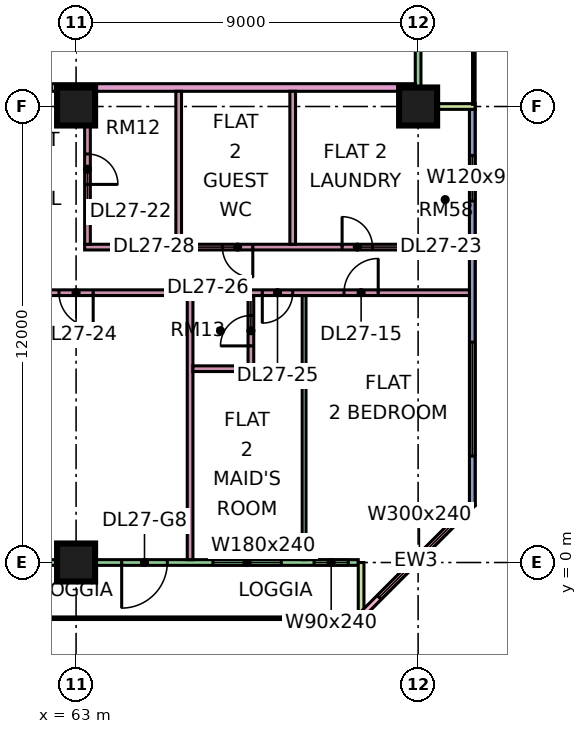
"""IFC4 building model, lengths in metres.
Left out: names, types, materials, properties, quantities, classifications, styles, units other than length and angle.
Written with IfcOpenShell. Run it as: python <this file> out.ifc"""

import sys

from ifc_helpers import new_model, si_unit, direction, frame, frame_2d, origin, origin_2d, place, context, subcontext, project, spatial, rectangle, extrude, element, fill, save


model = new_model("IFC4")
c1 = context("Model", 3, precision=1e-05, world=origin(), true_north=direction((0.0, 1.0)))
c2 = subcontext(c1, "Body", "Model", "MODEL_VIEW")
j1 = project(units=[si_unit("LENGTHUNIT", "METRE"), si_unit("PLANEANGLEUNIT", "RADIAN")], contexts=[c1])
p1 = place(None, origin())
s1 = spatial("IfcSite", under=j1, at=p1, CompositionType="ELEMENT")
p2 = place(p1, origin())
s2 = spatial("IfcBuilding", under=s1, at=p2, CompositionType="ELEMENT")
p3 = place(p2, frame((0.0, 0.0, 118.15)))
s3 = spatial("IfcBuildingStorey", under=s2, at=p3, CompositionType="ELEMENT", Elevation=118.15)
for number, where, z_axis, x_axis in (
    (1, (63.0, 0.0, 0.0), (0.0, 0.0, 1.0), (1.0, 0.0, 0.0)),
    (2, (63.0, 12.0, 0.0), (0.0, 0.0, 1.0), (1.0, 0.0, 0.0)),
    (3, (72.0, 12.0, 0.0), (0.0, 0.0, 1.0), (1.0, 0.0, 0.0)),
):
    element("IfcColumn", number, at=place(p3, frame(where, z_axis=z_axis, x_axis=x_axis)), inside=s3, PredefinedType="COLUMN", context=c2, shape_type="SweptSolid", body=[
        extrude(rectangle(XDim=1.0, YDim=1.0, at=origin_2d()), origin(), (0.0, 0.0, 1.0), 3.75),
    ])
p4 = place(p3, frame((60.075, 0.0, 0.0), z_axis=(0.0, 0.0, 1.0), x_axis=(1.0, 0.0, 0.0)))
e4 = element("IfcWall", 4, at=p4, inside=s3, PredefinedType="SOLIDWALL", context=c2, shape_type="SweptSolid", body=[
    extrude(rectangle(XDim=10.35, YDim=0.15, at=frame_2d((5.175, 0.0))), origin(), (0.0, 0.0, 1.0), 3.35),
])
p5 = place(p4, frame((0.562, 0.0, 0.45)))
e5 = element("IfcOpeningElement", 5, at=p5, cuts=e4, PredefinedType="OPENING", context=c2, shape_type="SweptSolid", body=[
    extrude(rectangle(XDim=1.2, YDim=2.4, at=frame_2d((0.6, 1.2))), frame((0.0, 0.085, 0.0), z_axis=(0.0, -1.0, 0.0), x_axis=(1.0, 0.0, 0.0)), (0.0, 0.0, 1.0), 0.17),
])
p6 = place(p4, frame((4.125, 0.0, 0.0)))
e6 = element("IfcOpeningElement", 6, at=p6, cuts=e4, PredefinedType="OPENING", context=c2, shape_type="SweptSolid", body=[
    extrude(rectangle(XDim=1.2, YDim=2.4, at=frame_2d((0.6, 1.2))), frame((0.0, 0.085, 0.0), z_axis=(0.0, -1.0, 0.0), x_axis=(1.0, 0.0, 0.0)), (0.0, 0.0, 1.0), 0.17),
])
p7 = place(p4, frame((6.525, 0.0, 0.45)))
e7 = element("IfcOpeningElement", 7, at=p7, cuts=e4, PredefinedType="OPENING", context=c2, shape_type="SweptSolid", body=[
    extrude(rectangle(XDim=1.8, YDim=2.4, at=frame_2d((0.9, 1.2))), frame((0.0, 0.085, 0.0), z_axis=(0.0, -1.0, 0.0), x_axis=(1.0, 0.0, 0.0)), (0.0, 0.0, 1.0), 0.17),
])
p8 = place(p4, frame((9.188, 0.0, 0.45)))
e8 = element("IfcOpeningElement", 8, at=p8, cuts=e4, PredefinedType="OPENING", context=c2, shape_type="SweptSolid", body=[
    extrude(rectangle(XDim=0.9, YDim=2.4, at=frame_2d((0.45, 1.2))), frame((0.0, 0.085, 0.0), z_axis=(0.0, -1.0, 0.0), x_axis=(1.0, 0.0, 0.0)), (0.0, 0.0, 1.0), 0.17),
])
p9 = place(p3, frame((70.5, -1.5, 0.0), z_axis=(0.0, 0.0, 1.0), x_axis=(0.0, 1.0, 0.0)))
e9 = element("IfcWall", 9, at=p9, inside=s3, PredefinedType="SOLIDWALL", context=c2, shape_type="SweptSolid", body=[
    extrude(rectangle(XDim=1.5, YDim=0.15, at=frame_2d((0.75, 0.0))), origin(), (0.0, 0.0, 1.0), 3.35),
])
p10 = place(p3, frame((70.447, -1.447, 0.0), z_axis=(0.0, 0.0, 1.0), x_axis=(0.707106781187, 0.707106781187, 0.0)))
e10 = element("IfcWall", 10, at=p10, inside=s3, PredefinedType="SOLIDWALL", context=c2, shape_type="SweptSolid", body=[
    extrude(rectangle(XDim=4.243, YDim=0.15, at=frame_2d((2.121, 0.0))), origin(), (0.0, 0.0, 1.0), 3.35),
])
p11 = place(p10, frame((0.744, 0.0, 0.45)))
e11 = element("IfcOpeningElement", 11, at=p11, cuts=e10, PredefinedType="OPENING", context=c2, shape_type="SweptSolid", body=[
    extrude(rectangle(XDim=3.0, YDim=2.4, at=frame_2d((1.5, 1.2))), frame((0.0, 0.085, 0.0), z_axis=(0.0, -1.0, 0.0), x_axis=(1.0, 0.0, 0.0)), (0.0, 0.0, 1.0), 0.17),
])
p12 = place(p3, frame((73.425, 1.5, 0.0), z_axis=(0.0, 0.0, 1.0), x_axis=(0.0, 1.0, 0.0)))
e12 = element("IfcWall", 12, at=p12, inside=s3, PredefinedType="SOLIDWALL", context=c2, shape_type="SweptSolid", body=[
    extrude(rectangle(XDim=10.425, YDim=0.15, at=frame_2d((5.212, 0.0))), origin(), (0.0, 0.0, 1.0), 3.35),
])
p13 = place(p12, frame((1.3, 0.0, 0.45)))
e13 = element("IfcOpeningElement", 13, at=p13, cuts=e12, PredefinedType="OPENING", context=c2, shape_type="SweptSolid", body=[
    extrude(rectangle(XDim=3.0, YDim=2.4, at=frame_2d((1.5, 1.2))), frame((0.0, 0.085, 0.0), z_axis=(0.0, -1.0, 0.0), x_axis=(1.0, 0.0, 0.0)), (0.0, 0.0, 1.0), 0.17),
])
p14 = place(p12, frame((8.012, 0.0, 1.7)))
e14 = element("IfcOpeningElement", 14, at=p14, cuts=e12, PredefinedType="OPENING", context=c2, shape_type="SweptSolid", body=[
    extrude(rectangle(XDim=1.2, YDim=0.9, at=frame_2d((0.6, 0.45))), frame((0.0, 0.085, 0.0), z_axis=(0.0, -1.0, 0.0), x_axis=(1.0, 0.0, 0.0)), (0.0, 0.0, 1.0), 0.17),
])
p15 = place(p3, frame((72.0, 12.075, 0.0), z_axis=(0.0, 0.0, 1.0), x_axis=(0.0, 1.0, 0.0)))
e15 = element("IfcWall", 15, at=p15, inside=s3, PredefinedType="SOLIDWALL", context=c2, shape_type="SweptSolid", body=[
    extrude(rectangle(XDim=10.35, YDim=0.15, at=frame_2d((5.175, 0.0))), origin(), (0.0, 0.0, 1.0), 3.35),
])
p16 = place(p15, frame((3.975, 0.0, 0.45)))
e16 = element("IfcOpeningElement", 16, at=p16, cuts=e15, PredefinedType="OPENING", context=c2, shape_type="SweptSolid", body=[
    extrude(rectangle(XDim=2.4, YDim=2.4, at=frame_2d((1.2, 1.2))), frame((0.0, 0.085, 0.0), z_axis=(0.0, -1.0, 0.0), x_axis=(1.0, 0.0, 0.0)), (0.0, 0.0, 1.0), 0.17),
])
p17 = place(p15, frame((7.688, 0.0, 0.0)))
e17 = element("IfcOpeningElement", 17, at=p17, cuts=e15, PredefinedType="OPENING", context=c2, shape_type="SweptSolid", body=[
    extrude(rectangle(XDim=1.8, YDim=2.4, at=frame_2d((0.9, 1.2))), frame((0.0, 0.085, 0.0), z_axis=(0.0, -1.0, 0.0), x_axis=(1.0, 0.0, 0.0)), (0.0, 0.0, 1.0), 0.17),
])
p18 = place(p3, frame((73.5, 12.0, 0.0), z_axis=(0.0, 0.0, 1.0), x_axis=(-1.0, 0.0, 0.0)))
e18 = element("IfcWall", 18, at=p18, inside=s3, PredefinedType="SOLIDWALL", context=c2, shape_type="SweptSolid", body=[
    extrude(rectangle(XDim=1.5, YDim=0.15, at=frame_2d((0.75, 0.0))), origin(), (0.0, 0.0, 1.0), 3.35),
])
p19 = place(p3, frame((40.65, 12.5, 0.0), z_axis=(0.0, 0.0, 1.0), x_axis=(1.0, 0.0, 0.0)))
e19 = element("IfcWall", 19, at=p19, inside=s3, PredefinedType="PARTITIONING", context=c2, shape_type="SweptSolid", body=[
    extrude(rectangle(XDim=31.276, YDim=0.2, at=frame_2d((15.638, 0.0))), origin(), (0.0, 0.0, 1.0), 3.35),
])
p20 = place(p19, frame((20.7, 0.0, 0.0)))
e20 = element("IfcOpeningElement", 20, at=p20, cuts=e19, PredefinedType="OPENING", context=c2, shape_type="SweptSolid", body=[
    extrude(rectangle(XDim=1.0, YDim=2.1, at=frame_2d((0.5, 1.05))), frame((0.0, 0.11, 0.0), z_axis=(0.0, -1.0, 0.0), x_axis=(1.0, 0.0, 0.0)), (0.0, 0.0, 1.0), 0.22),
])
p21 = place(p19, frame((1.05, 0.0, 0.0)))
e21 = element("IfcOpeningElement", 21, at=p21, cuts=e19, PredefinedType="OPENING", context=c2, shape_type="SweptSolid", body=[
    extrude(rectangle(XDim=1.0, YDim=2.1, at=frame_2d((0.5, 1.05))), frame((0.0, 0.11, 0.0), z_axis=(0.0, -1.0, 0.0), x_axis=(1.0, 0.0, 0.0)), (0.0, 0.0, 1.0), 0.22),
])
p22 = place(p3, frame((48.1, 7.1, 0.0), z_axis=(0.0, 0.0, 1.0), x_axis=(1.0, 0.0, 0.0)))
e22 = element("IfcWall", 22, at=p22, inside=s3, PredefinedType="PARTITIONING", context=c2, shape_type="SweptSolid", body=[
    extrude(rectangle(XDim=25.25, YDim=0.15, at=frame_2d((12.625, 0.0))), origin(), (0.0, 0.0, 1.0), 3.35),
])
p23 = place(p22, frame((0.95, 0.0, 0.0)))
e23 = element("IfcOpeningElement", 23, at=p23, cuts=e22, PredefinedType="OPENING", context=c2, shape_type="SweptSolid", body=[
    extrude(rectangle(XDim=0.9, YDim=2.1, at=frame_2d((0.45, 1.05))), frame((0.0, 0.085, 0.0), z_axis=(0.0, -1.0, 0.0), x_axis=(1.0, 0.0, 0.0)), (0.0, 0.0, 1.0), 0.17),
])
p24 = place(p22, frame((21.95, 0.0, 0.0)))
e24 = element("IfcOpeningElement", 24, at=p24, cuts=e22, PredefinedType="OPENING", context=c2, shape_type="SweptSolid", body=[
    extrude(rectangle(XDim=0.9, YDim=2.1, at=frame_2d((0.45, 1.05))), frame((0.0, 0.085, 0.0), z_axis=(0.0, -1.0, 0.0), x_axis=(1.0, 0.0, 0.0)), (0.0, 0.0, 1.0), 0.17),
])
p25 = place(p22, frame((9.95, 0.0, 0.0)))
e25 = element("IfcOpeningElement", 25, at=p25, cuts=e22, PredefinedType="OPENING", context=c2, shape_type="SweptSolid", body=[
    extrude(rectangle(XDim=0.9, YDim=2.1, at=frame_2d((0.45, 1.05))), frame((0.0, 0.085, 0.0), z_axis=(0.0, -1.0, 0.0), x_axis=(1.0, 0.0, 0.0)), (0.0, 0.0, 1.0), 0.17),
])
p26 = place(p22, frame((14.45, 0.0, 0.0)))
e26 = element("IfcOpeningElement", 26, at=p26, cuts=e22, PredefinedType="OPENING", context=c2, shape_type="SweptSolid", body=[
    extrude(rectangle(XDim=0.9, YDim=2.1, at=frame_2d((0.45, 1.05))), frame((0.0, 0.085, 0.0), z_axis=(0.0, -1.0, 0.0), x_axis=(1.0, 0.0, 0.0)), (0.0, 0.0, 1.0), 0.17),
])
p27 = place(p22, frame((19.8, 0.0, 0.0)))
e27 = element("IfcOpeningElement", 27, at=p27, cuts=e22, PredefinedType="OPENING", context=c2, shape_type="SweptSolid", body=[
    extrude(rectangle(XDim=0.8, YDim=2.1, at=frame_2d((0.4, 1.05))), frame((0.0, 0.085, 0.0), z_axis=(0.0, -1.0, 0.0), x_axis=(1.0, 0.0, 0.0)), (0.0, 0.0, 1.0), 0.17),
])
p28 = place(p22, frame((3.95, 0.0, 0.0)))
e28 = element("IfcOpeningElement", 28, at=p28, cuts=e22, PredefinedType="OPENING", context=c2, shape_type="SweptSolid", body=[
    extrude(rectangle(XDim=0.9, YDim=2.1, at=frame_2d((0.45, 1.05))), frame((0.0, 0.085, 0.0), z_axis=(0.0, -1.0, 0.0), x_axis=(1.0, 0.0, 0.0)), (0.0, 0.0, 1.0), 0.17),
])
p29 = place(p3, frame((63.225, 8.3, 0.0), z_axis=(0.0, 0.0, 1.0), x_axis=(1.0, 0.0, 0.0)))
e29 = element("IfcWall", 29, at=p29, inside=s3, PredefinedType="PARTITIONING", context=c2, shape_type="SweptSolid", body=[
    extrude(rectangle(XDim=10.125, YDim=0.15, at=frame_2d((5.062, 0.0))), origin(), (0.0, 0.0, 1.0), 3.35),
])
p30 = place(p29, frame((6.775, 0.0, 0.0)))
e30 = element("IfcOpeningElement", 30, at=p30, cuts=e29, PredefinedType="OPENING", context=c2, shape_type="SweptSolid", body=[
    extrude(rectangle(XDim=0.8, YDim=2.1, at=frame_2d((0.4, 1.05))), frame((0.0, 0.085, 0.0), z_axis=(0.0, -1.0, 0.0), x_axis=(1.0, 0.0, 0.0)), (0.0, 0.0, 1.0), 0.17),
])
p31 = place(p29, frame((3.625, 0.0, 0.0)))
e31 = element("IfcOpeningElement", 31, at=p31, cuts=e29, PredefinedType="OPENING", context=c2, shape_type="SweptSolid", body=[
    extrude(rectangle(XDim=0.8, YDim=2.1, at=frame_2d((0.4, 1.05))), frame((0.0, 0.085, 0.0), z_axis=(0.0, -1.0, 0.0), x_axis=(1.0, 0.0, 0.0)), (0.0, 0.0, 1.0), 0.17),
])
p32 = place(p3, frame((63.3, 8.375, 0.0), z_axis=(0.0, 0.0, 1.0), x_axis=(0.0, 1.0, 0.0)))
e32 = element("IfcWall", 32, at=p32, inside=s3, PredefinedType="PARTITIONING", context=c2, shape_type="SweptSolid", body=[
    extrude(rectangle(XDim=4.025, YDim=0.15, at=frame_2d((2.012, 0.0))), origin(), (0.0, 0.0, 1.0), 3.35),
])
p33 = place(p32, frame((1.575, 0.0, 0.0)))
e33 = element("IfcOpeningElement", 33, at=p33, cuts=e32, PredefinedType="OPENING", context=c2, shape_type="SweptSolid", body=[
    extrude(rectangle(XDim=0.8, YDim=2.1, at=frame_2d((0.4, 1.05))), frame((0.0, 0.085, 0.0), z_axis=(0.0, -1.0, 0.0), x_axis=(1.0, 0.0, 0.0)), (0.0, 0.0, 1.0), 0.17),
])
p34 = place(p3, frame((65.7, 8.375, 0.0), z_axis=(0.0, 0.0, 1.0), x_axis=(0.0, 1.0, 0.0)))
e34 = element("IfcWall", 34, at=p34, inside=s3, PredefinedType="PARTITIONING", context=c2, shape_type="SweptSolid", body=[
    extrude(rectangle(XDim=4.025, YDim=0.15, at=frame_2d((2.012, 0.0))), origin(), (0.0, 0.0, 1.0), 3.35),
])
p35 = place(p3, frame((66.0, 0.074, 0.0), z_axis=(0.0, 0.0, 1.0), x_axis=(0.0, 1.0, 0.0)))
e35 = element("IfcWall", 35, at=p35, inside=s3, PredefinedType="PARTITIONING", context=c2, shape_type="SweptSolid", body=[
    extrude(rectangle(XDim=6.951, YDim=0.15, at=frame_2d((3.476, 0.0))), origin(), (0.0, 0.0, 1.0), 3.35),
])
p36 = place(p3, frame((66.075, 5.1, 0.0), z_axis=(0.0, 0.0, 1.0), x_axis=(1.0, 0.0, 0.0)))
e36 = element("IfcWall", 36, at=p36, inside=s3, PredefinedType="PARTITIONING", context=c2, shape_type="SweptSolid", body=[
    extrude(rectangle(XDim=1.45, YDim=0.15, at=frame_2d((0.725, 0.0))), origin(), (0.0, 0.0, 1.0), 3.35),
])
p37 = place(p3, frame((67.6, 5.025, 0.0), z_axis=(0.0, 0.0, 1.0), x_axis=(0.0, 1.0, 0.0)))
e37 = element("IfcWall", 37, at=p37, inside=s3, PredefinedType="PARTITIONING", context=c2, shape_type="SweptSolid", body=[
    extrude(rectangle(XDim=2.0, YDim=0.15, at=frame_2d((1.0, 0.0))), origin(), (0.0, 0.0, 1.0), 3.35),
])
p38 = place(p37, frame((0.675, 0.0, 0.0)))
e38 = element("IfcOpeningElement", 38, at=p38, cuts=e37, PredefinedType="OPENING", context=c2, shape_type="SweptSolid", body=[
    extrude(rectangle(XDim=0.8, YDim=2.1, at=frame_2d((0.4, 1.05))), frame((0.0, 0.085, 0.0), z_axis=(0.0, -1.0, 0.0), x_axis=(1.0, 0.0, 0.0)), (0.0, 0.0, 1.0), 0.17),
])
p39 = place(p3, frame((68.7, 8.375, 0.0), z_axis=(0.0, 0.0, 1.0), x_axis=(0.0, 1.0, 0.0)))
e39 = element("IfcWall", 39, at=p39, inside=s3, PredefinedType="PARTITIONING", context=c2, shape_type="SweptSolid", body=[
    extrude(rectangle(XDim=4.025, YDim=0.15, at=frame_2d((2.012, 0.0))), origin(), (0.0, 0.0, 1.0), 3.35),
])
p40 = place(p3, frame((69.0, 0.074, 0.0), z_axis=(0.0, 0.0, 1.0), x_axis=(0.0, 1.0, 0.0)))
e40 = element("IfcWall", 40, at=p40, inside=s3, PredefinedType="PARTITIONING", context=c2, shape_type="SweptSolid", body=[
    extrude(rectangle(XDim=6.951, YDim=0.1, at=frame_2d((3.476, 0.0))), origin(), (0.0, 0.0, 1.0), 3.35),
])
p41 = place(p6, frame((1.2, 0.0, 0.0), z_axis=(0.0, 0.0, 1.0), x_axis=(-1.0, 0.0, 0.0)))
e41 = element("IfcDoor", 41, at=p41, inside=s3, OperationType="DOUBLE_DOOR_SINGLE_SWING", PredefinedType="DOOR", context=c2, shape_type="SweptSolid", body=[
    extrude(rectangle(XDim=1.2, YDim=2.4, at=frame_2d((0.6, 1.2))), frame((0.0, 0.025, 0.0), z_axis=(0.0, -1.0, 0.0), x_axis=(1.0, 0.0, 0.0)), (0.0, 0.0, 1.0), 0.05),
])
fill(e6, e41)
p42 = place(p7, origin())
e42 = element("IfcWindow", 42, at=p42, inside=s3, PartitioningType="SINGLE_PANEL", PredefinedType="WINDOW", context=c2, shape_type="SweptSolid", body=[
    extrude(rectangle(XDim=1.8, YDim=2.4, at=frame_2d((0.9, 1.2))), frame((0.0, 0.03, 0.0), z_axis=(0.0, -1.0, 0.0), x_axis=(1.0, 0.0, 0.0)), (0.0, 0.0, 1.0), 0.06),
])
fill(e7, e42)
p43 = place(p8, origin())
e43 = element("IfcWindow", 43, at=p43, inside=s3, PartitioningType="SINGLE_PANEL", PredefinedType="WINDOW", context=c2, shape_type="SweptSolid", body=[
    extrude(rectangle(XDim=0.9, YDim=2.4, at=frame_2d((0.45, 1.2))), frame((0.0, 0.03, 0.0), z_axis=(0.0, -1.0, 0.0), x_axis=(1.0, 0.0, 0.0)), (0.0, 0.0, 1.0), 0.06),
])
fill(e8, e43)
p44 = place(p11, origin())
e44 = element("IfcWindow", 44, at=p44, inside=s3, PartitioningType="SINGLE_PANEL", PredefinedType="WINDOW", context=c2, shape_type="SweptSolid", body=[
    extrude(rectangle(XDim=3.0, YDim=2.4, at=frame_2d((1.5, 1.2))), frame((0.0, 0.03, 0.0), z_axis=(0.0, -1.0, 0.0), x_axis=(1.0, 0.0, 0.0)), (0.0, 0.0, 1.0), 0.06),
])
fill(e11, e44)
p45 = place(p13, origin())
e45 = element("IfcWindow", 45, at=p45, inside=s3, PartitioningType="SINGLE_PANEL", PredefinedType="WINDOW", context=c2, shape_type="SweptSolid", body=[
    extrude(rectangle(XDim=3.0, YDim=2.4, at=frame_2d((1.5, 1.2))), frame((0.0, 0.03, 0.0), z_axis=(0.0, -1.0, 0.0), x_axis=(1.0, 0.0, 0.0)), (0.0, 0.0, 1.0), 0.06),
])
fill(e13, e45)
p46 = place(p14, origin())
e46 = element("IfcWindow", 46, at=p46, inside=s3, PartitioningType="SINGLE_PANEL", PredefinedType="WINDOW", context=c2, shape_type="SweptSolid", body=[
    extrude(rectangle(XDim=1.2, YDim=0.9, at=frame_2d((0.6, 0.45))), frame((0.0, 0.03, 0.0), z_axis=(0.0, -1.0, 0.0), x_axis=(1.0, 0.0, 0.0)), (0.0, 0.0, 1.0), 0.06),
])
fill(e14, e46)
p47 = place(p24, frame((0.9, 0.0, 0.0), z_axis=(0.0, 0.0, 1.0), x_axis=(-1.0, 0.0, 0.0)))
e47 = element("IfcDoor", 47, at=p47, inside=s3, OperationType="SINGLE_SWING_RIGHT", PredefinedType="DOOR", context=c2, shape_type="SweptSolid", body=[
    extrude(rectangle(XDim=0.9, YDim=2.1, at=frame_2d((0.45, 1.05))), frame((0.0, 0.025, 0.0), z_axis=(0.0, -1.0, 0.0), x_axis=(1.0, 0.0, 0.0)), (0.0, 0.0, 1.0), 0.05),
])
fill(e24, e47)
p48 = place(p33, frame((0.8, 0.0, 0.0), z_axis=(0.0, 0.0, 1.0), x_axis=(-1.0, 0.0, 0.0)))
e48 = element("IfcDoor", 48, at=p48, inside=s3, OperationType="SINGLE_SWING_LEFT", PredefinedType="DOOR", context=c2, shape_type="SweptSolid", body=[
    extrude(rectangle(XDim=0.8, YDim=2.1, at=frame_2d((0.4, 1.05))), frame((0.0, 0.025, 0.0), z_axis=(0.0, -1.0, 0.0), x_axis=(1.0, 0.0, 0.0)), (0.0, 0.0, 1.0), 0.05),
])
fill(e33, e48)
p49 = place(p30, origin())
e49 = element("IfcDoor", 49, at=p49, inside=s3, OperationType="SINGLE_SWING_LEFT", PredefinedType="DOOR", context=c2, shape_type="SweptSolid", body=[
    extrude(rectangle(XDim=0.8, YDim=2.1, at=frame_2d((0.4, 1.05))), frame((0.0, 0.025, 0.0), z_axis=(0.0, -1.0, 0.0), x_axis=(1.0, 0.0, 0.0)), (0.0, 0.0, 1.0), 0.05),
])
fill(e30, e49)
p50 = place(p26, origin())
e50 = element("IfcDoor", 50, at=p50, inside=s3, OperationType="SINGLE_SWING_RIGHT", PredefinedType="DOOR", context=c2, shape_type="SweptSolid", body=[
    extrude(rectangle(XDim=0.9, YDim=2.1, at=frame_2d((0.45, 1.05))), frame((0.0, 0.025, 0.0), z_axis=(0.0, -1.0, 0.0), x_axis=(1.0, 0.0, 0.0)), (0.0, 0.0, 1.0), 0.05),
])
fill(e26, e50)
p51 = place(p27, frame((0.8, 0.0, 0.0), z_axis=(0.0, 0.0, 1.0), x_axis=(-1.0, 0.0, 0.0)))
e51 = element("IfcDoor", 51, at=p51, inside=s3, OperationType="SINGLE_SWING_LEFT", PredefinedType="DOOR", context=c2, shape_type="SweptSolid", body=[
    extrude(rectangle(XDim=0.8, YDim=2.1, at=frame_2d((0.4, 1.05))), frame((0.0, 0.025, 0.0), z_axis=(0.0, -1.0, 0.0), x_axis=(1.0, 0.0, 0.0)), (0.0, 0.0, 1.0), 0.05),
])
fill(e27, e51)
p52 = place(p38, origin())
e52 = element("IfcDoor", 52, at=p52, inside=s3, OperationType="SINGLE_SWING_LEFT", PredefinedType="DOOR", context=c2, shape_type="SweptSolid", body=[
    extrude(rectangle(XDim=0.8, YDim=2.1, at=frame_2d((0.4, 1.05))), frame((0.0, 0.025, 0.0), z_axis=(0.0, -1.0, 0.0), x_axis=(1.0, 0.0, 0.0)), (0.0, 0.0, 1.0), 0.05),
])
fill(e38, e52)
p53 = place(p31, origin())
e53 = element("IfcDoor", 53, at=p53, inside=s3, OperationType="SINGLE_SWING_RIGHT", PredefinedType="DOOR", context=c2, shape_type="SweptSolid", body=[
    extrude(rectangle(XDim=0.8, YDim=2.1, at=frame_2d((0.4, 1.05))), frame((0.0, 0.025, 0.0), z_axis=(0.0, -1.0, 0.0), x_axis=(1.0, 0.0, 0.0)), (0.0, 0.0, 1.0), 0.05),
])
fill(e31, e53)
save(model, sys.argv[1])
